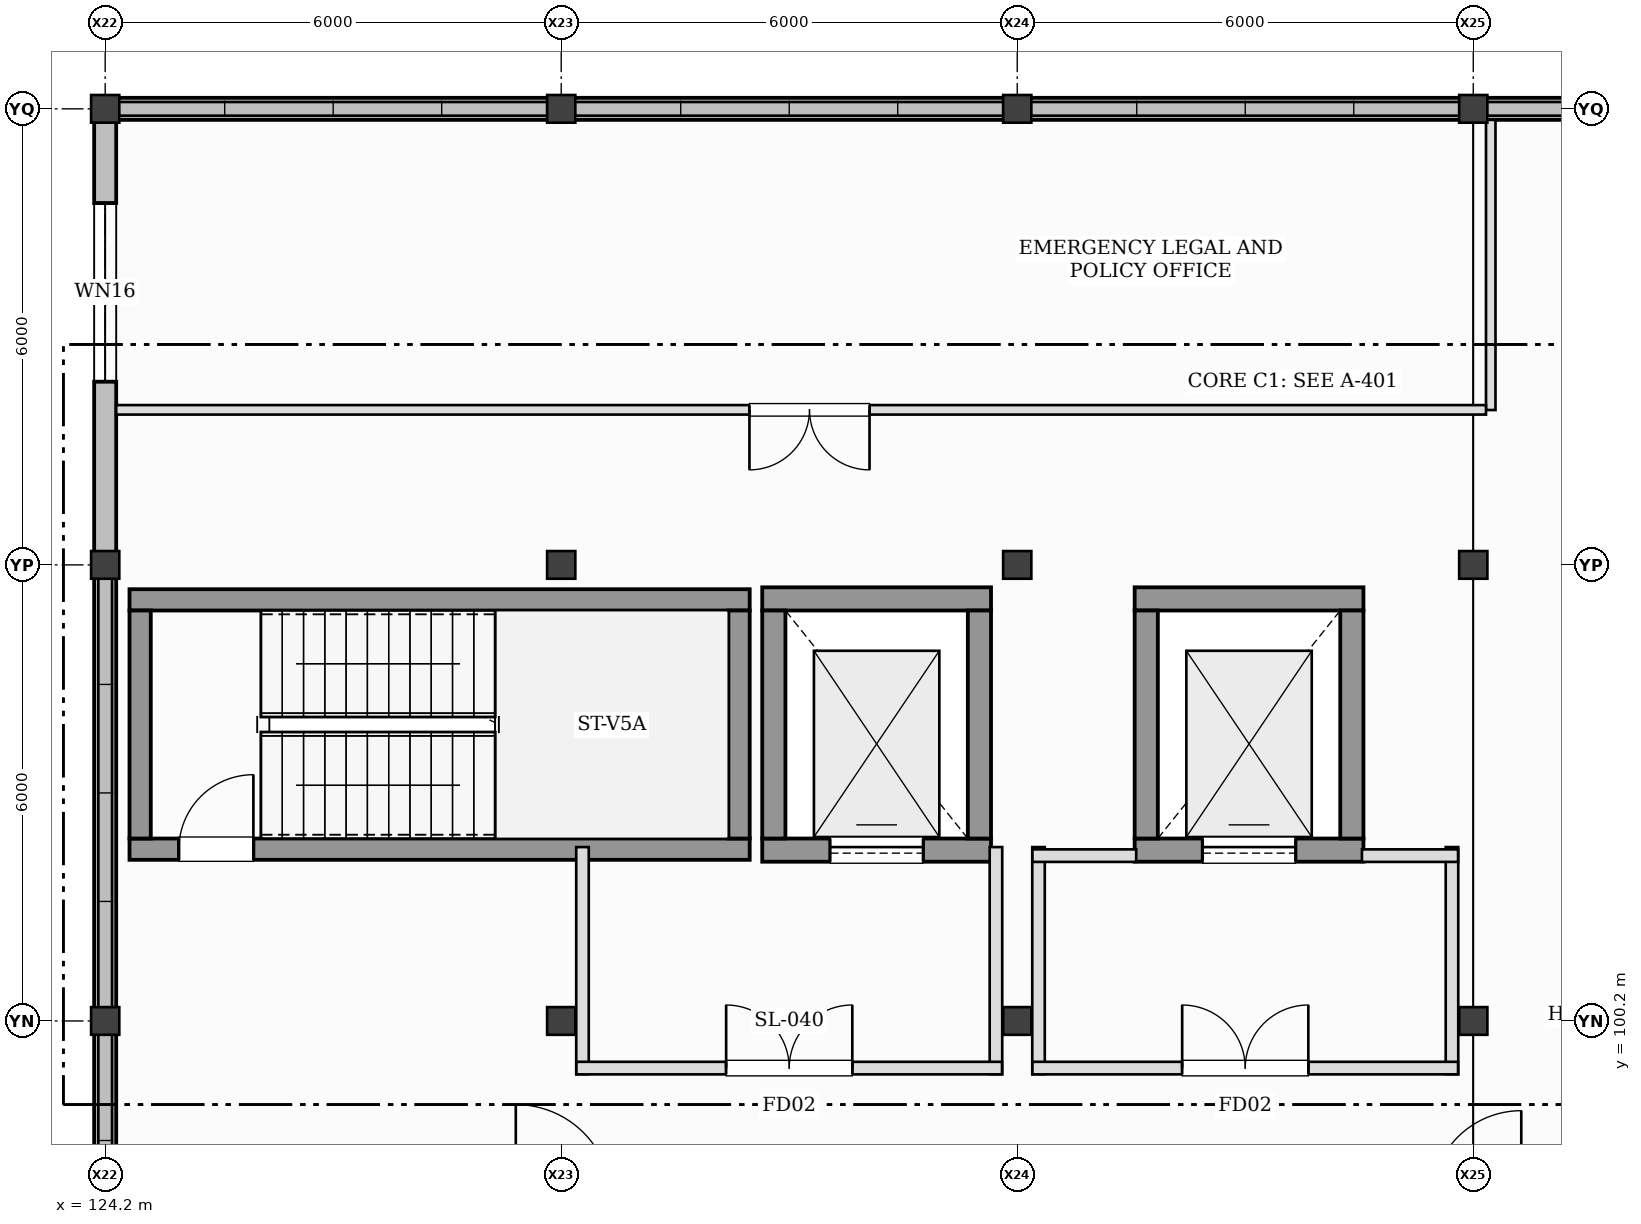
"""IFC4 building model, lengths in metres.
Left out: names, types, materials, properties, quantities, classifications, styles, units other than length and angle.
Written with IfcOpenShell. Run it as: python <this file> out.ifc"""

import sys

from ifc_helpers import new_model, si_unit, direction, frame, frame_2d, origin, origin_2d, place, context, subcontext, project, spatial, rectangle, i_section, extrude, element, fill, save


model = new_model("IFC4")
c1 = context("Model", 3, precision=1e-05, world=origin(), true_north=direction((0.0, 1.0)))
c2 = subcontext(c1, "Body", "Model", "MODEL_VIEW")
j1 = project(units=[si_unit("LENGTHUNIT", "METRE"), si_unit("PLANEANGLEUNIT", "RADIAN")], contexts=[c1])
p1 = place(None, origin())
s1 = spatial("IfcSite", under=j1, at=p1, CompositionType="ELEMENT")
p2 = place(p1, origin())
s2 = spatial("IfcBuilding", under=s1, at=p2, CompositionType="ELEMENT")
p3 = place(p2, frame((0.0, 0.0, 10.0)))
s3 = spatial("IfcBuildingStorey", under=s2, at=p3, CompositionType="ELEMENT", Elevation=10.0)
for number, where, z_axis, x_axis in (
    (1, (124.2, 100.2, 0.0), (0.0, 0.0, 1.0), (1.0, 0.0, 0.0)),
    (2, (124.2, 106.2, 0.0), (0.0, 0.0, 1.0), (1.0, 0.0, 0.0)),
    (3, (124.2, 112.2, 0.0), (0.0, 0.0, 1.0), (1.0, 0.0, 0.0)),
    (4, (130.2, 100.2, 0.0), (0.0, 0.0, 1.0), (1.0, 0.0, 0.0)),
    (5, (130.2, 106.2, 0.0), (0.0, 0.0, 1.0), (1.0, 0.0, 0.0)),
    (6, (130.2, 112.2, 0.0), (0.0, 0.0, 1.0), (1.0, 0.0, 0.0)),
    (7, (136.2, 100.2, 0.0), (0.0, 0.0, 1.0), (1.0, 0.0, 0.0)),
    (8, (136.2, 106.2, 0.0), (0.0, 0.0, 1.0), (1.0, 0.0, 0.0)),
    (9, (136.2, 112.2, 0.0), (0.0, 0.0, 1.0), (1.0, 0.0, 0.0)),
    (10, (142.2, 100.2, 0.0), (0.0, 0.0, 1.0), (1.0, 0.0, 0.0)),
    (11, (142.2, 106.2, 0.0), (0.0, 0.0, 1.0), (1.0, 0.0, 0.0)),
    (12, (142.2, 112.2, 0.0), (0.0, 0.0, 1.0), (1.0, 0.0, 0.0)),
):
    element("IfcColumn", number, at=place(p3, frame(where, z_axis=z_axis, x_axis=x_axis)), inside=s3, PredefinedType="COLUMN", context=c2, shape_type="SweptSolid", body=[
        extrude(i_section(OverallWidth=0.371, OverallDepth=0.364, WebThickness=0.013, FlangeThickness=0.022, at=origin_2d()), origin(), (0.0, 0.0, 1.0), 4.0),
    ])
p4 = place(p3, frame((130.055, 112.2, 0.0), z_axis=(0.0, 0.0, 1.0), x_axis=(-1.0, 0.0, 0.0)))
e13 = element("IfcWall", 13, at=p4, inside=s3, PredefinedType="STANDARD", context=c2, shape_type="SweptSolid", body=[
    extrude(rectangle(XDim=5.71, YDim=0.29, at=frame_2d((2.855, 0.0))), origin(), (0.0, 0.0, 1.0), 0.32),
])
p5 = place(p3, frame((136.055, 112.2, 0.0), z_axis=(0.0, 0.0, 1.0), x_axis=(-1.0, 0.0, 0.0)))
e14 = element("IfcWall", 14, at=p5, inside=s3, PredefinedType="STANDARD", context=c2, shape_type="SweptSolid", body=[
    extrude(rectangle(XDim=5.71, YDim=0.29, at=frame_2d((2.855, 0.0))), origin(), (0.0, 0.0, 1.0), 0.44),
])
p6 = place(p3, frame((142.055, 112.2, 0.0), z_axis=(0.0, 0.0, 1.0), x_axis=(-1.0, 0.0, 0.0)))
e15 = element("IfcWall", 15, at=p6, inside=s3, PredefinedType="STANDARD", context=c2, shape_type="SweptSolid", body=[
    extrude(rectangle(XDim=5.71, YDim=0.29, at=frame_2d((2.855, 0.0))), origin(), (0.0, 0.0, 1.0), 0.56),
])
p7 = place(p3, frame((148.055, 112.2, 0.0), z_axis=(0.0, 0.0, 1.0), x_axis=(-1.0, 0.0, 0.0)))
e16 = element("IfcWall", 16, at=p7, inside=s3, PredefinedType="STANDARD", context=c2, shape_type="SweptSolid", body=[
    extrude(rectangle(XDim=5.71, YDim=0.29, at=frame_2d((2.855, 0.0))), origin(), (0.0, 0.0, 1.0), 0.68),
])
p8 = place(p3, frame((124.2, 100.055, 0.0), z_axis=(0.0, 0.0, 1.0), x_axis=(0.0, -1.0, 0.0)))
e17 = element("IfcWall", 17, at=p8, inside=s3, PredefinedType="STANDARD", context=c2, shape_type="SweptSolid", body=[
    extrude(rectangle(XDim=5.71, YDim=0.29, at=frame_2d((2.855, 0.0))), origin(), (0.0, 0.0, 1.0), 0.32),
])
p9 = place(p3, frame((124.2, 106.055, 0.0), z_axis=(0.0, 0.0, 1.0), x_axis=(0.0, -1.0, 0.0)))
e18 = element("IfcWall", 18, at=p9, inside=s3, PredefinedType="STANDARD", context=c2, shape_type="SweptSolid", body=[
    extrude(rectangle(XDim=5.71, YDim=0.29, at=frame_2d((2.855, 0.0))), origin(), (0.0, 0.0, 1.0), 0.44),
])
p10 = place(p3, frame((124.2, 112.055, 0.0), z_axis=(0.0, 0.0, 1.0), x_axis=(0.0, -1.0, 0.0)))
e19 = element("IfcWall", 19, at=p10, inside=s3, PredefinedType="STANDARD", context=c2, shape_type="SweptSolid", body=[
    extrude(rectangle(XDim=5.71, YDim=0.29, at=frame_2d((2.855, 0.0))), origin(), (0.0, 0.0, 1.0), 3.253),
])
p11 = place(p10, frame((1.095, 0.0, 1.0)))
e20 = element("IfcOpeningElement", 20, at=p11, cuts=e19, PredefinedType="OPENING", context=c2, shape_type="SweptSolid", body=[
    extrude(rectangle(XDim=2.35, YDim=1.55, at=frame_2d((1.175, 0.775))), frame((0.0, 0.155, 0.0), z_axis=(0.0, -1.0, 0.0), x_axis=(1.0, 0.0, 0.0)), (0.0, 0.0, 1.0), 0.31),
])
p12 = place(p3, frame((124.52, 102.46, 0.0), z_axis=(0.0, 0.0, 1.0), x_axis=(1.0, 0.0, 0.0)))
e21 = element("IfcWall", 21, at=p12, inside=s3, PredefinedType="SHEAR", context=c2, shape_type="SweptSolid", body=[
    extrude(rectangle(XDim=8.16, YDim=0.28, at=frame_2d((4.08, 0.0))), origin(), (0.0, 0.0, 1.0), 4.0),
])
p13 = place(p12, frame((0.65, 0.0, 0.0)))
e22 = element("IfcOpeningElement", 22, at=p13, cuts=e21, PredefinedType="OPENING", context=c2, shape_type="SweptSolid", body=[
    extrude(rectangle(XDim=0.98, YDim=2.15, at=frame_2d((0.49, 1.075))), frame((0.0, 0.15, 0.0), z_axis=(0.0, -1.0, 0.0), x_axis=(1.0, 0.0, 0.0)), (0.0, 0.0, 1.0), 0.3),
])
p14 = place(p3, frame((132.68, 105.74, 0.0), z_axis=(0.0, 0.0, 1.0), x_axis=(-1.0, 0.0, 0.0)))
e23 = element("IfcWall", 23, at=p14, inside=s3, PredefinedType="SHEAR", context=c2, shape_type="SweptSolid", body=[
    extrude(rectangle(XDim=8.16, YDim=0.28, at=frame_2d((4.08, 0.0))), origin(), (0.0, 0.0, 1.0), 4.0),
])
for number, where, z_axis, x_axis in (
    (24, (124.66, 105.6, 0.0), (0.0, 0.0, 1.0), (0.0, -1.0, 0.0)),
    (25, (132.54, 102.6, 0.0), (0.0, 0.0, 1.0), (0.0, 1.0, 0.0)),
):
    element("IfcWall", number, at=place(p3, frame(where, z_axis=z_axis, x_axis=x_axis)), inside=s3, PredefinedType="SHEAR", context=c2, shape_type="SweptSolid", body=[
        extrude(rectangle(XDim=3.0, YDim=0.28, at=frame_2d((1.5, 0.0))), origin(), (0.0, 0.0, 1.0), 4.0),
    ])
p15 = place(p3, frame((132.845, 102.448, 0.0), z_axis=(0.0, 0.0, 1.0), x_axis=(1.0, 0.0, 0.0)))
e26 = element("IfcWall", 26, at=p15, inside=s3, PredefinedType="SHEAR", context=c2, shape_type="SweptSolid", body=[
    extrude(rectangle(XDim=3.01, YDim=0.305, at=frame_2d((1.505, 0.0))), origin(), (0.0, 0.0, 1.0), 4.0),
])
p16 = place(p15, frame((0.895, 0.0, 0.0)))
e27 = element("IfcOpeningElement", 27, at=p16, cuts=e26, PredefinedType="OPENING", context=c2, shape_type="SweptSolid", body=[
    extrude(rectangle(XDim=1.22, YDim=2.22, at=frame_2d((0.61, 1.11))), frame((0.0, 0.162, 0.0), z_axis=(0.0, -1.0, 0.0), x_axis=(1.0, 0.0, 0.0)), (0.0, 0.0, 1.0), 0.325),
])
p17 = place(p3, frame((135.855, 105.752, 0.0), z_axis=(0.0, 0.0, 1.0), x_axis=(-1.0, 0.0, 0.0)))
e28 = element("IfcWall", 28, at=p17, inside=s3, PredefinedType="SHEAR", context=c2, shape_type="SweptSolid", body=[
    extrude(rectangle(XDim=3.01, YDim=0.305, at=frame_2d((1.505, 0.0))), origin(), (0.0, 0.0, 1.0), 4.0),
])
for number, where, z_axis, x_axis in (
    (29, (132.998, 105.6, 0.0), (0.0, 0.0, 1.0), (0.0, -1.0, 0.0)),
    (30, (135.702, 102.6, 0.0), (0.0, 0.0, 1.0), (0.0, 1.0, 0.0)),
):
    element("IfcWall", number, at=place(p3, frame(where, z_axis=z_axis, x_axis=x_axis)), inside=s3, PredefinedType="SHEAR", context=c2, shape_type="SweptSolid", body=[
        extrude(rectangle(XDim=3.0, YDim=0.305, at=frame_2d((1.5, 0.0))), origin(), (0.0, 0.0, 1.0), 4.0),
    ])
for number, where, z_axis, x_axis in (
    (31, (130.48, 99.5, 0.0), (0.0, 0.0, 1.0), (0.0, 1.0, 0.0)),
    (32, (135.92, 102.488, 0.0), (0.0, 0.0, 1.0), (0.0, -1.0, 0.0)),
):
    element("IfcWall", number, at=place(p3, frame(where, z_axis=z_axis, x_axis=x_axis)), inside=s3, PredefinedType="PARTITIONING", context=c2, shape_type="SweptSolid", body=[
        extrude(rectangle(XDim=2.988, YDim=0.165, at=frame_2d((1.494, 0.0))), origin(), (0.0, 0.0, 1.0), 3.253),
    ])
p18 = place(p3, frame((130.4, 99.58, 0.0), z_axis=(0.0, 0.0, 1.0), x_axis=(1.0, 0.0, 0.0)))
e33 = element("IfcWall", 33, at=p18, inside=s3, PredefinedType="PARTITIONING", context=c2, shape_type="SweptSolid", body=[
    extrude(rectangle(XDim=5.6, YDim=0.165, at=frame_2d((2.8, 0.0))), origin(), (0.0, 0.0, 1.0), 3.74),
])
p19 = place(p18, frame((1.97, 0.0, 0.0)))
e34 = element("IfcOpeningElement", 34, at=p19, cuts=e33, PredefinedType="OPENING", context=c2, shape_type="SweptSolid", body=[
    extrude(rectangle(XDim=1.66, YDim=2.2, at=frame_2d((0.83, 1.1))), frame((0.0, 0.093, 0.0), z_axis=(0.0, -1.0, 0.0), x_axis=(1.0, 0.0, 0.0)), (0.0, 0.0, 1.0), 0.185),
])
p20 = place(p3, frame((137.745, 102.448, 0.0), z_axis=(0.0, 0.0, 1.0), x_axis=(1.0, 0.0, 0.0)))
e35 = element("IfcWall", 35, at=p20, inside=s3, PredefinedType="SHEAR", context=c2, shape_type="SweptSolid", body=[
    extrude(rectangle(XDim=3.01, YDim=0.305, at=frame_2d((1.505, 0.0))), origin(), (0.0, 0.0, 1.0), 4.0),
])
p21 = place(p20, frame((0.895, 0.0, 0.0)))
e36 = element("IfcOpeningElement", 36, at=p21, cuts=e35, PredefinedType="OPENING", context=c2, shape_type="SweptSolid", body=[
    extrude(rectangle(XDim=1.22, YDim=2.22, at=frame_2d((0.61, 1.11))), frame((0.0, 0.162, 0.0), z_axis=(0.0, -1.0, 0.0), x_axis=(1.0, 0.0, 0.0)), (0.0, 0.0, 1.0), 0.325),
])
p22 = place(p3, frame((140.755, 105.752, 0.0), z_axis=(0.0, 0.0, 1.0), x_axis=(-1.0, 0.0, 0.0)))
e37 = element("IfcWall", 37, at=p22, inside=s3, PredefinedType="SHEAR", context=c2, shape_type="SweptSolid", body=[
    extrude(rectangle(XDim=3.01, YDim=0.305, at=frame_2d((1.505, 0.0))), origin(), (0.0, 0.0, 1.0), 4.0),
])
for number, where, z_axis, x_axis in (
    (38, (137.897, 105.6, 0.0), (0.0, 0.0, 1.0), (0.0, -1.0, 0.0)),
    (39, (140.603, 102.6, 0.0), (0.0, 0.0, 1.0), (0.0, 1.0, 0.0)),
):
    element("IfcWall", number, at=place(p3, frame(where, z_axis=z_axis, x_axis=x_axis)), inside=s3, PredefinedType="SHEAR", context=c2, shape_type="SweptSolid", body=[
        extrude(rectangle(XDim=3.0, YDim=0.305, at=frame_2d((1.5, 0.0))), origin(), (0.0, 0.0, 1.0), 4.0),
    ])
for number, where, z_axis, x_axis in (
    (40, (136.48, 99.5, 0.0), (0.0, 0.0, 1.0), (0.0, 1.0, 0.0)),
    (41, (141.92, 102.488, 0.0), (0.0, 0.0, 1.0), (0.0, -1.0, 0.0)),
):
    element("IfcWall", number, at=place(p3, frame(where, z_axis=z_axis, x_axis=x_axis)), inside=s3, PredefinedType="PARTITIONING", context=c2, shape_type="SweptSolid", body=[
        extrude(rectangle(XDim=2.988, YDim=0.165, at=frame_2d((1.494, 0.0))), origin(), (0.0, 0.0, 1.0), 3.253),
    ])
p23 = place(p3, frame((136.4, 102.375, 0.0), z_axis=(0.0, 0.0, 1.0), x_axis=(1.0, 0.0, 0.0)))
e42 = element("IfcWall", 42, at=p23, inside=s3, PredefinedType="PARTITIONING", context=c2, shape_type="SweptSolid", body=[
    extrude(rectangle(XDim=1.365, YDim=0.165, at=frame_2d((0.683, 0.0))), origin(), (0.0, 0.0, 1.0), 3.74),
])
p24 = place(p3, frame((140.735, 102.375, 0.0), z_axis=(0.0, 0.0, 1.0), x_axis=(1.0, 0.0, 0.0)))
e43 = element("IfcWall", 43, at=p24, inside=s3, PredefinedType="PARTITIONING", context=c2, shape_type="SweptSolid", body=[
    extrude(rectangle(XDim=1.265, YDim=0.165, at=frame_2d((0.632, 0.0))), origin(), (0.0, 0.0, 1.0), 3.74),
])
p25 = place(p3, frame((136.4, 99.58, 0.0), z_axis=(0.0, 0.0, 1.0), x_axis=(1.0, 0.0, 0.0)))
e44 = element("IfcWall", 44, at=p25, inside=s3, PredefinedType="PARTITIONING", context=c2, shape_type="SweptSolid", body=[
    extrude(rectangle(XDim=5.6, YDim=0.165, at=frame_2d((2.8, 0.0))), origin(), (0.0, 0.0, 1.0), 3.74),
])
p26 = place(p25, frame((1.97, 0.0, 0.0)))
e45 = element("IfcOpeningElement", 45, at=p26, cuts=e44, PredefinedType="OPENING", context=c2, shape_type="SweptSolid", body=[
    extrude(rectangle(XDim=1.66, YDim=2.2, at=frame_2d((0.83, 1.1))), frame((0.0, 0.093, 0.0), z_axis=(0.0, -1.0, 0.0), x_axis=(1.0, 0.0, 0.0)), (0.0, 0.0, 1.0), 0.185),
])
p27 = place(p3, frame((142.43, 112.055, 0.0), z_axis=(0.0, 0.0, 1.0), x_axis=(0.0, -1.0, 0.0)))
e46 = element("IfcWall", 46, at=p27, inside=s3, PredefinedType="PARTITIONING", context=c2, shape_type="SweptSolid", body=[
    extrude(rectangle(XDim=3.817, YDim=0.125, at=frame_2d((1.909, 0.0))), origin(), (0.0, 0.0, 1.0), 3.253),
])
p28 = place(p3, frame((142.367, 108.24, 0.0), z_axis=(0.0, 0.0, 1.0), x_axis=(-1.0, 0.0, 0.0)))
e47 = element("IfcWall", 47, at=p28, inside=s3, PredefinedType="PARTITIONING", context=c2, shape_type="SweptSolid", body=[
    extrude(rectangle(XDim=18.022, YDim=0.125, at=frame_2d((9.011, 0.0))), origin(), (0.0, 0.0, 1.0), 3.74),
])
p29 = place(p28, frame((8.111, 0.0, 0.0)))
e48 = element("IfcOpeningElement", 48, at=p29, cuts=e47, PredefinedType="OPENING", context=c2, shape_type="SweptSolid", body=[
    extrude(rectangle(XDim=1.58, YDim=2.2, at=frame_2d((0.79, 1.1))), frame((0.0, 0.073, 0.0), z_axis=(0.0, -1.0, 0.0), x_axis=(1.0, 0.0, 0.0)), (0.0, 0.0, 1.0), 0.145),
])
p30 = place(p11, origin())
e49 = element("IfcWindow", 49, at=p30, inside=s3, PartitioningType="SINGLE_PANEL", PredefinedType="WINDOW", context=c2, shape_type="SweptSolid", body=[
    extrude(rectangle(XDim=2.35, YDim=1.55, at=frame_2d((1.175, 0.775))), frame((0.0, 0.03, 0.0), z_axis=(0.0, -1.0, 0.0), x_axis=(1.0, 0.0, 0.0)), (0.0, 0.0, 1.0), 0.06),
])
fill(e20, e49)
p31 = place(p13, origin())
e50 = element("IfcDoor", 50, at=p31, inside=s3, OperationType="SINGLE_SWING_RIGHT", PredefinedType="DOOR", context=c2, shape_type="SweptSolid", body=[
    extrude(rectangle(XDim=0.98, YDim=2.15, at=frame_2d((0.49, 1.075))), frame((0.0, 0.025, 0.0), z_axis=(0.0, -1.0, 0.0), x_axis=(1.0, 0.0, 0.0)), (0.0, 0.0, 1.0), 0.05),
])
fill(e22, e50)
p32 = place(p16, origin())
e51 = element("IfcDoor", 51, at=p32, inside=s3, OperationType="SLIDING_TO_LEFT", PredefinedType="DOOR", context=c2, shape_type="SweptSolid", body=[
    extrude(rectangle(XDim=1.22, YDim=2.22, at=frame_2d((0.61, 1.11))), frame((0.0, 0.025, 0.0), z_axis=(0.0, -1.0, 0.0), x_axis=(1.0, 0.0, 0.0)), (0.0, 0.0, 1.0), 0.05),
])
fill(e27, e51)
p33 = place(p19, frame((1.66, 0.0, 0.0), z_axis=(0.0, 0.0, 1.0), x_axis=(-1.0, 0.0, 0.0)))
e52 = element("IfcDoor", 52, at=p33, inside=s3, OperationType="DOUBLE_DOOR_SINGLE_SWING", PredefinedType="DOOR", context=c2, shape_type="SweptSolid", body=[
    extrude(rectangle(XDim=1.66, YDim=2.2, at=frame_2d((0.83, 1.1))), frame((0.0, 0.025, 0.0), z_axis=(0.0, -1.0, 0.0), x_axis=(1.0, 0.0, 0.0)), (0.0, 0.0, 1.0), 0.05),
])
fill(e34, e52)
p34 = place(p21, origin())
e53 = element("IfcDoor", 53, at=p34, inside=s3, OperationType="SLIDING_TO_LEFT", PredefinedType="DOOR", context=c2, shape_type="SweptSolid", body=[
    extrude(rectangle(XDim=1.22, YDim=2.22, at=frame_2d((0.61, 1.11))), frame((0.0, 0.025, 0.0), z_axis=(0.0, -1.0, 0.0), x_axis=(1.0, 0.0, 0.0)), (0.0, 0.0, 1.0), 0.05),
])
fill(e36, e53)
p35 = place(p26, frame((1.66, 0.0, 0.0), z_axis=(0.0, 0.0, 1.0), x_axis=(-1.0, 0.0, 0.0)))
e54 = element("IfcDoor", 54, at=p35, inside=s3, OperationType="DOUBLE_DOOR_SINGLE_SWING", PredefinedType="DOOR", context=c2, shape_type="SweptSolid", body=[
    extrude(rectangle(XDim=1.66, YDim=2.2, at=frame_2d((0.83, 1.1))), frame((0.0, 0.025, 0.0), z_axis=(0.0, -1.0, 0.0), x_axis=(1.0, 0.0, 0.0)), (0.0, 0.0, 1.0), 0.05),
])
fill(e45, e54)
p36 = place(p29, frame((1.58, 0.0, 0.0), z_axis=(0.0, 0.0, 1.0), x_axis=(-1.0, 0.0, 0.0)))
e55 = element("IfcDoor", 55, at=p36, inside=s3, OperationType="DOUBLE_DOOR_SINGLE_SWING", PredefinedType="DOOR", context=c2, shape_type="SweptSolid", body=[
    extrude(rectangle(XDim=1.58, YDim=2.2, at=frame_2d((0.79, 1.1))), frame((0.0, 0.025, 0.0), z_axis=(0.0, -1.0, 0.0), x_axis=(1.0, 0.0, 0.0)), (0.0, 0.0, 1.0), 0.05),
])
fill(e48, e55)
save(model, sys.argv[1])
